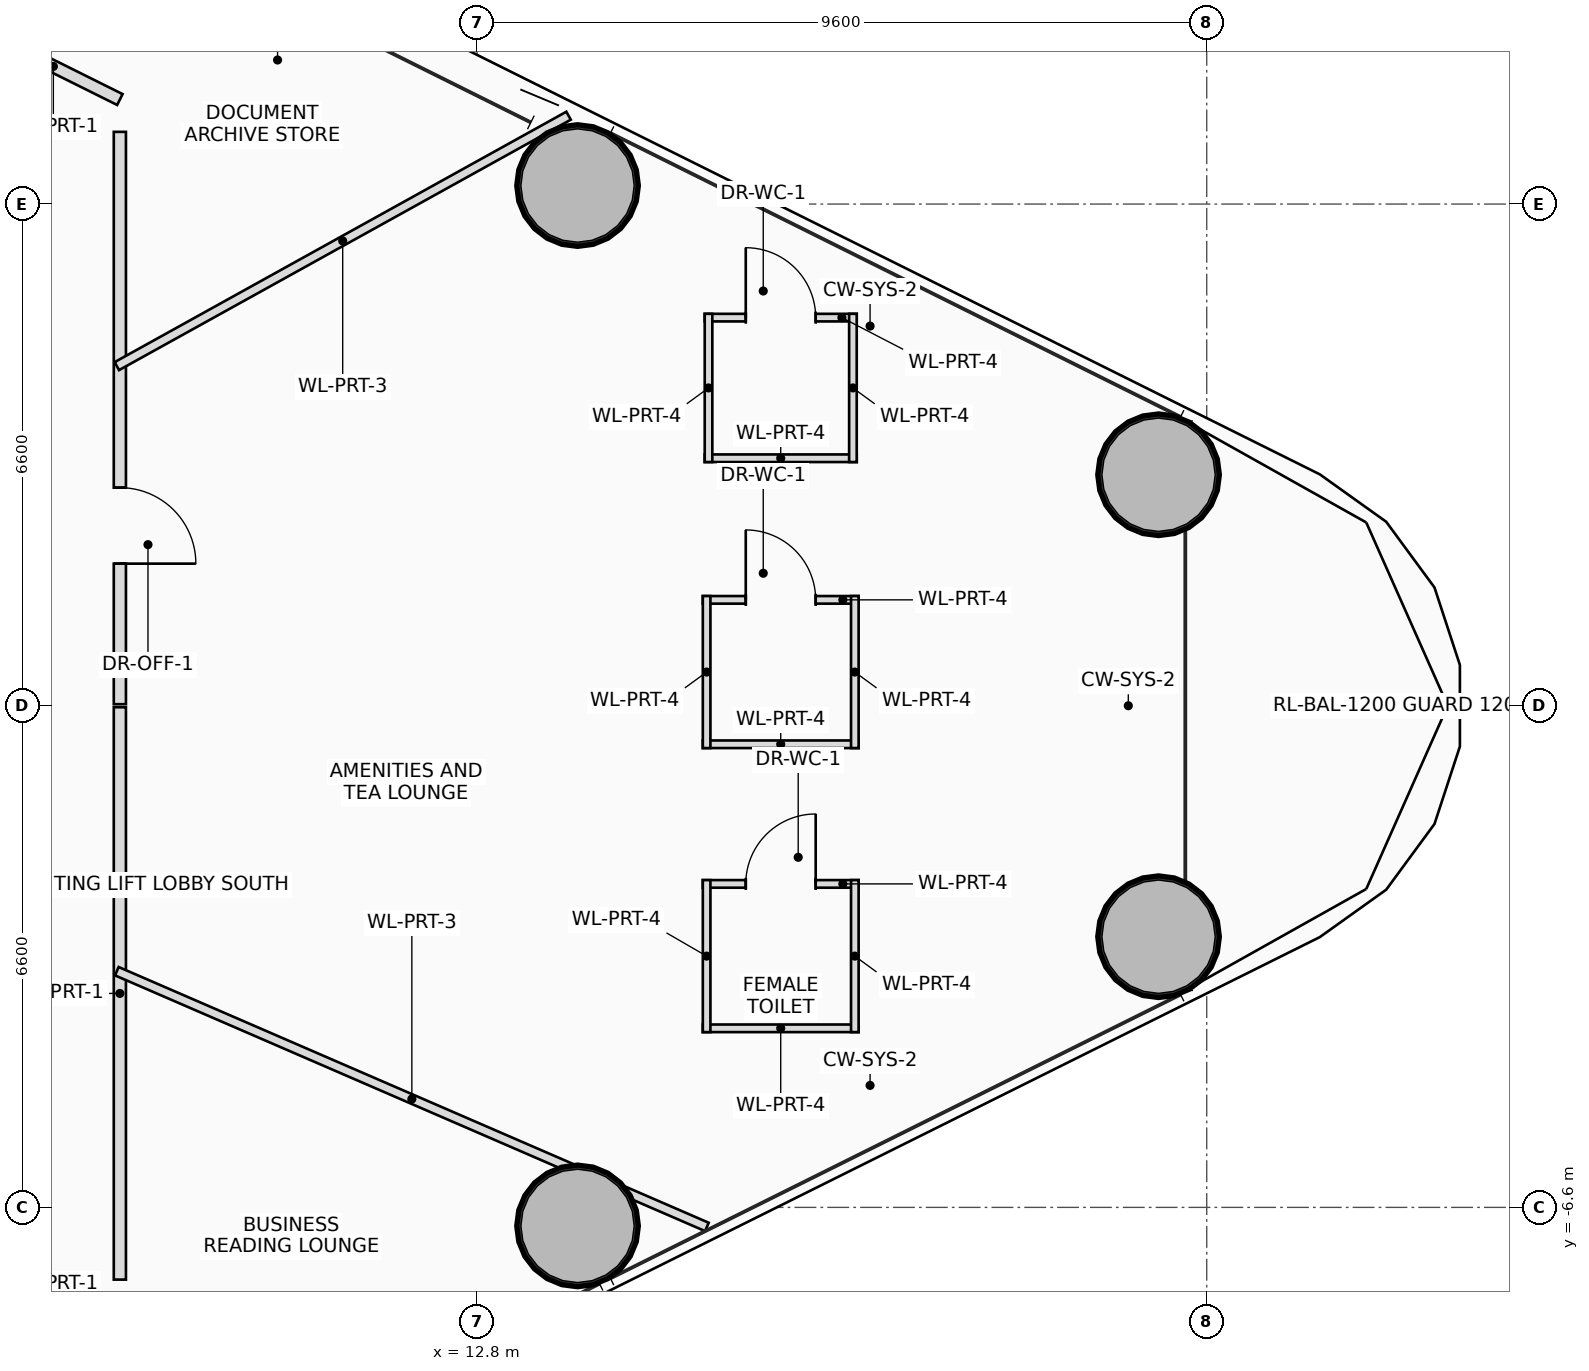
"""IFC4 building model, lengths in metres.
Left out: names, types, materials, properties, quantities, classifications, styles, units other than length and angle.
Written with IfcOpenShell. Run it as: python <this file> out.ifc"""

import sys

from ifc_helpers import new_model, si_unit, direction, frame, frame_2d, origin, origin_2d, place, context, subcontext, project, spatial, rectangle, hollow_circle, extrude, source, transform, mapped, element, fill, save


model = new_model("IFC4")
c1 = context("Model", 3, precision=1e-05, world=origin(), true_north=direction((0.0, 1.0)))
c2 = subcontext(c1, "Body", "Model", "MODEL_VIEW")
j1 = project(units=[si_unit("LENGTHUNIT", "METRE"), si_unit("PLANEANGLEUNIT", "RADIAN")], contexts=[c1])
p1 = place(None, origin())
s1 = spatial("IfcSite", under=j1, at=p1, CompositionType="ELEMENT")
p2 = place(p1, origin())
s2 = spatial("IfcBuilding", under=s1, at=p2, CompositionType="ELEMENT")
p3 = place(p2, frame((0.0, 0.0, 34.9)))
s3 = spatial("IfcBuildingStorey", under=s2, at=p3, CompositionType="ELEMENT", Elevation=34.9)
m1 = source(origin(), c2, "Body", "SweptSolid", [
    extrude(hollow_circle(Radius=0.8, WallThickness=0.055, at=origin_2d()), origin(), (0.0, 0.0, 1.0), 3.7),
])
for number, where, z_axis, x_axis in (
    (1, (14.122, -6.844, 0.0), (0.0, 0.0, 1.0), (1.0, 0.0, 0.0)),
    (2, (21.766, -3.039, 0.0), (0.0, 0.0, 1.0), (1.0, 0.0, 0.0)),
    (3, (21.766, 3.039, 0.0), (0.0, 0.0, 1.0), (1.0, 0.0, 0.0)),
    (4, (14.122, 6.844, 0.0), (0.0, 0.0, 1.0), (1.0, 0.0, 0.0)),
):
    element("IfcColumn", number, at=place(p3, frame(where, z_axis=z_axis, x_axis=x_axis)), inside=s3, PredefinedType="COLUMN", context=c2, shape_type="MappedRepresentation", body=[
        mapped(m1, transform((0.0, 0.0, 0.0), scale=1.0)),
    ])
p4 = place(p3, frame((15.77, 1.393, 0.0), z_axis=(0.0, 0.0, 1.0), x_axis=(1.0, 0.0, 0.0)))
e5 = element("IfcWall", 5, at=p4, inside=s3, PredefinedType="PARTITIONING", context=c2, shape_type="SweptSolid", body=[
    extrude(rectangle(XDim=2.05, YDim=0.1, at=frame_2d((1.025, 0.0))), origin(), (0.0, 0.0, 1.0), 3.15),
])
p5 = place(p4, frame((0.565, 0.0, 0.0)))
e6 = element("IfcOpeningElement", 6, at=p5, cuts=e5, PredefinedType="OPENING", context=c2, shape_type="SweptSolid", body=[
    extrude(rectangle(XDim=0.92, YDim=2.1, at=frame_2d((0.46, 1.05))), frame((0.0, 0.06, 0.0), z_axis=(0.0, -1.0, 0.0), x_axis=(1.0, 0.0, 0.0)), (0.0, 0.0, 1.0), 0.12),
])
p6 = place(p3, frame((17.82, -0.507, 0.0), z_axis=(0.0, 0.0, 1.0), x_axis=(-1.0, 0.0, 0.0)))
e7 = element("IfcWall", 7, at=p6, inside=s3, PredefinedType="PARTITIONING", context=c2, shape_type="SweptSolid", body=[
    extrude(rectangle(XDim=2.05, YDim=0.1, at=frame_2d((1.025, 0.0))), origin(), (0.0, 0.0, 1.0), 3.15),
])
p7 = place(p3, frame((17.77, 1.443, 0.0), z_axis=(0.0, 0.0, 1.0), x_axis=(0.0, -1.0, 0.0)))
e8 = element("IfcWall", 8, at=p7, inside=s3, PredefinedType="PARTITIONING", context=c2, shape_type="SweptSolid", body=[
    extrude(rectangle(XDim=2.0, YDim=0.1, at=frame_2d((1.0, 0.0))), origin(), (0.0, 0.0, 1.0), 3.15),
])
p8 = place(p3, frame((15.82, -0.557, 0.0), z_axis=(0.0, 0.0, 1.0), x_axis=(0.0, 1.0, 0.0)))
e9 = element("IfcWall", 9, at=p8, inside=s3, PredefinedType="PARTITIONING", context=c2, shape_type="SweptSolid", body=[
    extrude(rectangle(XDim=2.0, YDim=0.1, at=frame_2d((1.0, 0.0))), origin(), (0.0, 0.0, 1.0), 3.495),
])
p9 = place(p3, frame((15.77, -2.344, 0.0), z_axis=(0.0, 0.0, 1.0), x_axis=(1.0, 0.0, 0.0)))
e10 = element("IfcWall", 10, at=p9, inside=s3, PredefinedType="PARTITIONING", context=c2, shape_type="SweptSolid", body=[
    extrude(rectangle(XDim=2.05, YDim=0.1, at=frame_2d((1.025, 0.0))), origin(), (0.0, 0.0, 1.0), 3.15),
])
p10 = place(p9, frame((0.565, 0.0, 0.0)))
e11 = element("IfcOpeningElement", 11, at=p10, cuts=e10, PredefinedType="OPENING", context=c2, shape_type="SweptSolid", body=[
    extrude(rectangle(XDim=0.92, YDim=2.1, at=frame_2d((0.46, 1.05))), frame((0.0, 0.06, 0.0), z_axis=(0.0, -1.0, 0.0), x_axis=(1.0, 0.0, 0.0)), (0.0, 0.0, 1.0), 0.12),
])
p11 = place(p3, frame((17.82, -4.244, 0.0), z_axis=(0.0, 0.0, 1.0), x_axis=(-1.0, 0.0, 0.0)))
e12 = element("IfcWall", 12, at=p11, inside=s3, PredefinedType="PARTITIONING", context=c2, shape_type="SweptSolid", body=[
    extrude(rectangle(XDim=2.05, YDim=0.1, at=frame_2d((1.025, 0.0))), origin(), (0.0, 0.0, 1.0), 3.495),
])
for number, where, z_axis, x_axis in (
    (13, (17.77, -2.294, 0.0), (0.0, 0.0, 1.0), (0.0, -1.0, 0.0)),
    (14, (15.82, -4.294, 0.0), (0.0, 0.0, 1.0), (0.0, 1.0, 0.0)),
):
    element("IfcWall", number, at=place(p3, frame(where, z_axis=z_axis, x_axis=x_axis)), inside=s3, PredefinedType="PARTITIONING", context=c2, shape_type="SweptSolid", body=[
        extrude(rectangle(XDim=2.0, YDim=0.1, at=frame_2d((1.0, 0.0))), origin(), (0.0, 0.0, 1.0), 2.8),
    ])
p12 = place(p3, frame((15.795, 5.106, 0.0), z_axis=(0.0, 0.0, 1.0), x_axis=(1.0, 0.0, 0.0)))
e15 = element("IfcWall", 15, at=p12, inside=s3, PredefinedType="PARTITIONING", context=c2, shape_type="SweptSolid", body=[
    extrude(rectangle(XDim=2.0, YDim=0.1, at=frame_2d((1.0, 0.0))), origin(), (0.0, 0.0, 1.0), 2.96),
])
p13 = place(p12, frame((0.54, 0.0, 0.0)))
e16 = element("IfcOpeningElement", 16, at=p13, cuts=e15, PredefinedType="OPENING", context=c2, shape_type="SweptSolid", body=[
    extrude(rectangle(XDim=0.92, YDim=2.1, at=frame_2d((0.46, 1.05))), frame((0.0, 0.06, 0.0), z_axis=(0.0, -1.0, 0.0), x_axis=(1.0, 0.0, 0.0)), (0.0, 0.0, 1.0), 0.12),
])
p14 = place(p3, frame((17.795, 3.256, 0.0), z_axis=(0.0, 0.0, 1.0), x_axis=(-1.0, 0.0, 0.0)))
e17 = element("IfcWall", 17, at=p14, inside=s3, PredefinedType="PARTITIONING", context=c2, shape_type="SweptSolid", body=[
    extrude(rectangle(XDim=2.0, YDim=0.1, at=frame_2d((1.0, 0.0))), origin(), (0.0, 0.0, 1.0), 3.15),
])
for number, where, z_axis, x_axis in (
    (18, (17.745, 5.156, 0.0), (0.0, 0.0, 1.0), (0.0, -1.0, 0.0)),
    (19, (15.845, 3.206, 0.0), (0.0, 0.0, 1.0), (0.0, 1.0, 0.0)),
):
    element("IfcWall", number, at=place(p3, frame(where, z_axis=z_axis, x_axis=x_axis)), inside=s3, PredefinedType="PARTITIONING", context=c2, shape_type="SweptSolid", body=[
        extrude(rectangle(XDim=1.95, YDim=0.1, at=frame_2d((0.975, 0.0))), origin(), (0.0, 0.0, 1.0), 2.8),
    ])
p15 = place(p3, frame((6.35, 8.846, 0.0), z_axis=(0.0, 0.0, 1.0), x_axis=(0.89527489017, -0.445514164793, 0.0)))
e20 = element("IfcWall", 20, at=p15, inside=s3, PredefinedType="PARTITIONING", context=c2, shape_type="SweptSolid", body=[
    extrude(rectangle(XDim=1.955, YDim=0.16, at=frame_2d((0.977, 0.0))), origin(), (0.0, 0.0, 1.0), 2.8),
])
p16 = place(p3, frame((8.1, 7.55, 0.0), z_axis=(0.0, 0.0, 1.0), x_axis=(0.0, -1.0, 0.0)))
e21 = element("IfcWall", 21, at=p16, inside=s3, PredefinedType="PARTITIONING", context=c2, shape_type="SweptSolid", body=[
    extrude(rectangle(XDim=7.53, YDim=0.16, at=frame_2d((3.765, 0.0))), origin(), (0.0, 0.0, 1.0), 2.8),
])
p17 = place(p16, frame((4.681, 0.0, 0.0)))
e22 = element("IfcOpeningElement", 22, at=p17, cuts=e21, PredefinedType="OPENING", context=c2, shape_type="SweptSolid", body=[
    extrude(rectangle(XDim=1.0, YDim=2.25, at=frame_2d((0.5, 1.125))), frame((0.0, 0.09, 0.0), z_axis=(0.0, -1.0, 0.0), x_axis=(1.0, 0.0, 0.0)), (0.0, 0.0, 1.0), 0.18),
])
p18 = place(p3, frame((8.1, -0.02, 0.0), z_axis=(0.0, 0.0, 1.0), x_axis=(0.0, -1.0, 0.0)))
e23 = element("IfcWall", 23, at=p18, inside=s3, PredefinedType="PARTITIONING", context=c2, shape_type="SweptSolid", body=[
    extrude(rectangle(XDim=7.53, YDim=0.16, at=frame_2d((3.765, 0.0))), origin(), (0.0, 0.0, 1.0), 2.8),
])
p19 = place(p3, frame((8.06, 4.468, 0.0), z_axis=(0.0, 0.0, 1.0), x_axis=(0.874622878111, 0.484803899618, 0.0)))
e24 = element("IfcWall", 24, at=p19, inside=s3, PredefinedType="PARTITIONING", context=c2, shape_type="SweptSolid", body=[
    extrude(rectangle(XDim=6.796, YDim=0.12, at=frame_2d((3.398, 0.0))), origin(), (0.0, 0.0, 1.0), 2.8),
])
p20 = place(p3, frame((8.06, -3.493, 0.0), z_axis=(0.0, 0.0, 1.0), x_axis=(0.917561590562, -0.397593671385, 0.0)))
e25 = element("IfcWall", 25, at=p20, inside=s3, PredefinedType="PARTITIONING", context=c2, shape_type="SweptSolid", body=[
    extrude(rectangle(XDim=8.461, YDim=0.12, at=frame_2d((4.23, 0.0))), origin(), (0.0, 0.0, 1.0), 2.8),
])
p21 = place(p5, origin())
e26 = element("IfcDoor", 26, at=p21, inside=s3, OperationType="SINGLE_SWING_LEFT", PredefinedType="DOOR", context=c2, shape_type="SweptSolid", body=[
    extrude(rectangle(XDim=0.92, YDim=2.1, at=frame_2d((0.46, 1.05))), frame((0.0, 0.025, 0.0), z_axis=(0.0, -1.0, 0.0), x_axis=(1.0, 0.0, 0.0)), (0.0, 0.0, 1.0), 0.05),
])
fill(e6, e26)
p22 = place(p10, origin())
e27 = element("IfcDoor", 27, at=p22, inside=s3, OperationType="SINGLE_SWING_RIGHT", PredefinedType="DOOR", context=c2, shape_type="SweptSolid", body=[
    extrude(rectangle(XDim=0.92, YDim=2.1, at=frame_2d((0.46, 1.05))), frame((0.0, 0.025, 0.0), z_axis=(0.0, -1.0, 0.0), x_axis=(1.0, 0.0, 0.0)), (0.0, 0.0, 1.0), 0.05),
])
fill(e11, e27)
p23 = place(p13, origin())
e28 = element("IfcDoor", 28, at=p23, inside=s3, OperationType="SINGLE_SWING_LEFT", PredefinedType="DOOR", context=c2, shape_type="SweptSolid", body=[
    extrude(rectangle(XDim=0.92, YDim=2.1, at=frame_2d((0.46, 1.05))), frame((0.0, 0.025, 0.0), z_axis=(0.0, -1.0, 0.0), x_axis=(1.0, 0.0, 0.0)), (0.0, 0.0, 1.0), 0.05),
])
fill(e16, e28)
p24 = place(p17, origin())
e29 = element("IfcDoor", 29, at=p24, inside=s3, OperationType="SINGLE_SWING_RIGHT", PredefinedType="DOOR", context=c2, shape_type="SweptSolid", body=[
    extrude(rectangle(XDim=1.0, YDim=2.25, at=frame_2d((0.5, 1.125))), frame((0.0, 0.025, 0.0), z_axis=(0.0, -1.0, 0.0), x_axis=(1.0, 0.0, 0.0)), (0.0, 0.0, 1.0), 0.05),
])
fill(e22, e29)
save(model, sys.argv[1])
